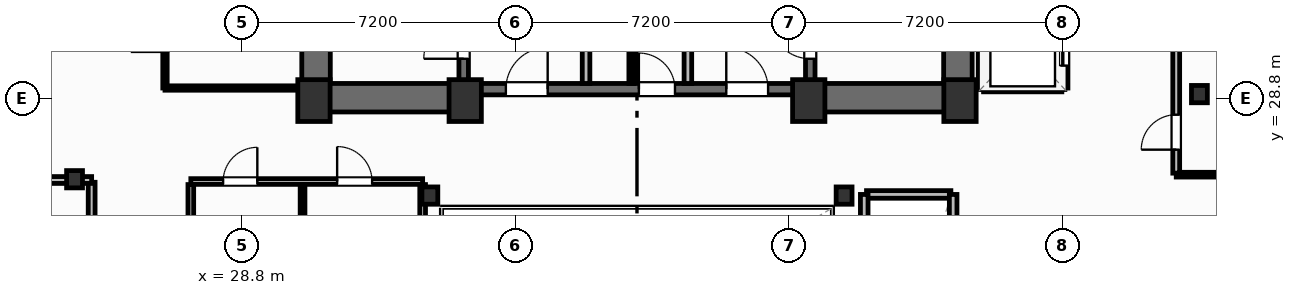
"""IFC4 building model, lengths in metres.
Left out: names, types, materials, properties, quantities, classifications, styles, units other than length and angle.
Written with IfcOpenShell. Run it as: python <this file> out.ifc"""

import sys

from ifc_helpers import new_model, si_unit, direction, frame, frame_2d, origin, origin_2d, place, context, subcontext, project, spatial, rectangle, i_section, extrude, element, fill, save


model = new_model("IFC4")
c1 = context("Model", 3, precision=1e-05, world=origin(), true_north=direction((0.0, 1.0)))
c2 = subcontext(c1, "Body", "Model", "MODEL_VIEW")
j1 = project(units=[si_unit("LENGTHUNIT", "METRE"), si_unit("PLANEANGLEUNIT", "RADIAN")], contexts=[c1])
p1 = place(None, origin())
s1 = spatial("IfcSite", under=j1, at=p1, CompositionType="ELEMENT")
p2 = place(p1, origin())
s2 = spatial("IfcBuilding", under=s1, at=p2, CompositionType="ELEMENT")
p3 = place(p2, frame((0.0, 0.0, 143.9)))
s3 = spatial("IfcBuildingStorey", under=s2, at=p3, CompositionType="ELEMENT", Elevation=143.9)
for number, where, z_axis, x_axis in (
    (1, (30.7, 28.75, 0.0), (0.0, 0.0, 1.0), (1.0, 0.0, 0.0)),
    (2, (34.68, 28.75, 0.0), (0.0, 0.0, 1.0), (1.0, 0.0, 0.0)),
    (3, (43.72, 28.75, 0.0), (0.0, 0.0, 1.0), (1.0, 0.0, 0.0)),
    (4, (47.7, 28.75, 0.0), (0.0, 0.0, 1.0), (1.0, 0.0, 0.0)),
):
    element("IfcColumn", number, at=place(p3, frame(where, z_axis=z_axis, x_axis=x_axis)), inside=s3, PredefinedType="COLUMN", context=c2, shape_type="SweptSolid", body=[
        extrude(rectangle(XDim=0.85, YDim=1.1, at=origin_2d()), origin(), (0.0, 0.0, 1.0), 3.7),
    ])
for number, where, z_axis, x_axis in (
    (5, (33.75, 26.25, 0.0), (0.0, 0.0, 1.0), (1.0, 0.0, 0.0)),
    (6, (44.65, 26.25, 0.0), (0.0, 0.0, 1.0), (1.0, 0.0, 0.0)),
    (7, (24.4, 26.68, 0.0), (0.0, 0.0, 1.0), (1.0, 0.0, 0.0)),
    (8, (54.0, 28.92, 0.0), (0.0, 0.0, 1.0), (1.0, 0.0, 0.0)),
):
    element("IfcColumn", number, at=place(p3, frame(where, z_axis=z_axis, x_axis=x_axis)), inside=s3, PredefinedType="COLUMN", context=c2, shape_type="SweptSolid", body=[
        extrude(i_section(OverallWidth=0.418, OverallDepth=0.455, WebThickness=0.042, FlangeThickness=0.068, FilletRadius=0.025, at=origin_2d()), origin(), (0.0, 0.0, 1.0), 3.7),
    ])
for number, where, z_axis, x_axis in (
    (9, (30.755, 29.2, 0.0), (0.0, 0.0, 1.0), (0.0, 1.0, 0.0)),
    (10, (47.645, 29.2, 0.0), (0.0, 0.0, 1.0), (0.0, 1.0, 0.0)),
):
    element("IfcWall", number, at=place(p3, frame(where, z_axis=z_axis, x_axis=x_axis)), inside=s3, PredefinedType="SHEAR", context=c2, shape_type="SweptSolid", body=[
        extrude(rectangle(XDim=9.22, YDim=0.75, at=frame_2d((4.61, 0.0))), origin(), (0.0, 0.0, 1.0), 3.45),
    ])
p4 = place(p3, frame((30.38, 28.825, 0.0), z_axis=(0.0, 0.0, 1.0), x_axis=(1.0, 0.0, 0.0)))
e11 = element("IfcWall", 11, at=p4, inside=s3, PredefinedType="SHEAR", context=c2, shape_type="SweptSolid", body=[
    extrude(rectangle(XDim=4.42, YDim=0.75, at=frame_2d((2.21, 0.0))), origin(), (0.0, 0.0, 1.0), 3.45),
])
p5 = place(p3, frame((43.6, 28.825, 0.0), z_axis=(0.0, 0.0, 1.0), x_axis=(1.0, 0.0, 0.0)))
e12 = element("IfcWall", 12, at=p5, inside=s3, PredefinedType="SHEAR", context=c2, shape_type="SweptSolid", body=[
    extrude(rectangle(XDim=4.42, YDim=0.75, at=frame_2d((2.21, 0.0))), origin(), (0.0, 0.0, 1.0), 3.45),
])
p6 = place(p3, frame((34.8, 29.05, 0.0), z_axis=(0.0, 0.0, 1.0), x_axis=(1.0, 0.0, 0.0)))
e13 = element("IfcWall", 13, at=p6, inside=s3, PredefinedType="SHEAR", context=c2, shape_type="SweptSolid", body=[
    extrude(rectangle(XDim=8.8, YDim=0.3, at=frame_2d((4.4, 0.0))), origin(), (0.0, 0.0, 1.0), 3.45),
])
p7 = place(p6, frame((0.95, 0.0, 0.0)))
e14 = element("IfcOpeningElement", 14, at=p7, cuts=e13, PredefinedType="OPENING", context=c2, shape_type="SweptSolid", body=[
    extrude(rectangle(XDim=1.1, YDim=2.15, at=frame_2d((0.55, 1.075))), frame((0.0, 0.16, 0.0), z_axis=(0.0, -1.0, 0.0), x_axis=(1.0, 0.0, 0.0)), (0.0, 0.0, 1.0), 0.32),
])
p8 = place(p6, frame((6.75, 0.0, 0.0)))
e15 = element("IfcOpeningElement", 15, at=p8, cuts=e13, PredefinedType="OPENING", context=c2, shape_type="SweptSolid", body=[
    extrude(rectangle(XDim=1.1, YDim=2.15, at=frame_2d((0.55, 1.075))), frame((0.0, 0.16, 0.0), z_axis=(0.0, -1.0, 0.0), x_axis=(1.0, 0.0, 0.0)), (0.0, 0.0, 1.0), 0.32),
])
p9 = place(p6, frame((4.45, 0.0, 0.0)))
e16 = element("IfcOpeningElement", 16, at=p9, cuts=e13, PredefinedType="OPENING", context=c2, shape_type="SweptSolid", body=[
    extrude(rectangle(XDim=0.95, YDim=2.15, at=frame_2d((0.475, 1.075))), frame((0.0, 0.16, 0.0), z_axis=(0.0, -1.0, 0.0), x_axis=(1.0, 0.0, 0.0)), (0.0, 0.0, 1.0), 0.32),
])
p10 = place(p3, frame((34.64, 29.2, 0.0), z_axis=(0.0, 0.0, 1.0), x_axis=(0.0, 1.0, 0.0)))
e17 = element("IfcWall", 17, at=p10, inside=s3, PredefinedType="SHEAR", context=c2, shape_type="SweptSolid", body=[
    extrude(rectangle(XDim=9.22, YDim=0.25, at=frame_2d((4.61, 0.0))), origin(), (0.0, 0.0, 1.0), 3.45),
])
p11 = place(p10, frame((0.65, 0.0, 0.0)))
e18 = element("IfcOpeningElement", 18, at=p11, cuts=e17, PredefinedType="OPENING", context=c2, shape_type="SweptSolid", body=[
    extrude(rectangle(XDim=1.05, YDim=2.15, at=frame_2d((0.525, 1.075))), frame((0.0, 0.135, 0.0), z_axis=(0.0, -1.0, 0.0), x_axis=(1.0, 0.0, 0.0)), (0.0, 0.0, 1.0), 0.27),
])
p12 = place(p3, frame((43.76, 29.2, 0.0), z_axis=(0.0, 0.0, 1.0), x_axis=(0.0, 1.0, 0.0)))
e19 = element("IfcWall", 19, at=p12, inside=s3, PredefinedType="SHEAR", context=c2, shape_type="SweptSolid", body=[
    extrude(rectangle(XDim=9.22, YDim=0.25, at=frame_2d((4.61, 0.0))), origin(), (0.0, 0.0, 1.0), 3.45),
])
p13 = place(p12, frame((0.65, 0.0, 0.0)))
e20 = element("IfcOpeningElement", 20, at=p13, cuts=e19, PredefinedType="OPENING", context=c2, shape_type="SweptSolid", body=[
    extrude(rectangle(XDim=1.05, YDim=2.15, at=frame_2d((0.525, 1.075))), frame((0.0, 0.135, 0.0), z_axis=(0.0, -1.0, 0.0), x_axis=(1.0, 0.0, 0.0)), (0.0, 0.0, 1.0), 0.27),
])
p14 = place(p3, frame((24.85, 23.03, 0.0), z_axis=(0.0, 0.0, 1.0), x_axis=(0.0, 1.0, 0.0)))
e21 = element("IfcWall", 21, at=p14, inside=s3, PredefinedType="PARTITIONING", context=c2, shape_type="SweptSolid", body=[
    extrude(rectangle(XDim=3.57, YDim=0.18, at=frame_2d((1.785, 0.0))), origin(), (0.0, 0.0, 1.0), 3.45),
])
p15 = place(p14, frame((1.5, 0.0, 0.0)))
e22 = element("IfcOpeningElement", 22, at=p15, cuts=e21, PredefinedType="OPENING", context=c2, shape_type="SweptSolid", body=[
    extrude(rectangle(XDim=0.92, YDim=2.05, at=frame_2d((0.46, 1.025))), frame((0.0, 0.1, 0.0), z_axis=(0.0, -1.0, 0.0), x_axis=(1.0, 0.0, 0.0)), (0.0, 0.0, 1.0), 0.2),
])
p16 = place(p3, frame((2.073, 26.66, 0.0), z_axis=(0.0, 0.0, 1.0), x_axis=(1.0, 0.0, 0.0)))
e23 = element("IfcWall", 23, at=p16, inside=s3, PredefinedType="PARTITIONING", context=c2, shape_type="SweptSolid", body=[
    extrude(rectangle(XDim=22.777, YDim=0.18, at=frame_2d((11.388, 0.0))), origin(), (0.0, 0.0, 1.0), 2.662),
])
p17 = place(p3, frame((53.39, 26.8, 0.0), z_axis=(0.0, 0.0, 1.0), x_axis=(1.0, 0.0, 0.0)))
e24 = element("IfcWall", 24, at=p17, inside=s3, PredefinedType="PARTITIONING", context=c2, shape_type="SweptSolid", body=[
    extrude(rectangle(XDim=23.283, YDim=0.125, at=frame_2d((11.642, 0.0))), origin(), (0.0, 0.0, 1.0), 3.45),
])
p18 = place(p3, frame((53.39, 26.84, 0.0), z_axis=(0.0, 0.0, 1.0), x_axis=(0.0, 1.0, 0.0)))
e25 = element("IfcWall", 25, at=p18, inside=s3, PredefinedType="PARTITIONING", context=c2, shape_type="SweptSolid", body=[
    extrude(rectangle(XDim=12.46, YDim=0.18, at=frame_2d((6.23, 0.0))), origin(), (0.0, 0.0, 1.0), 3.45),
])
p19 = place(p18, frame((0.618, 0.0, 0.0)))
e26 = element("IfcOpeningElement", 26, at=p19, cuts=e25, PredefinedType="OPENING", context=c2, shape_type="SweptSolid", body=[
    extrude(rectangle(XDim=0.92, YDim=2.05, at=frame_2d((0.46, 1.025))), frame((0.0, 0.1, 0.0), z_axis=(0.0, -1.0, 0.0), x_axis=(1.0, 0.0, 0.0)), (0.0, 0.0, 1.0), 0.2),
])
for number, where, z_axis, x_axis in (
    (27, (37.86, 29.2, 0.0), (0.0, 0.0, 1.0), (0.0, 1.0, 0.0)),
    (28, (40.54, 29.2, 0.0), (0.0, 0.0, 1.0), (0.0, 1.0, 0.0)),
):
    element("IfcWall", number, at=place(p3, frame(where, z_axis=z_axis, x_axis=x_axis)), inside=s3, PredefinedType="PARTITIONING", context=c2, shape_type="SweptSolid", body=[
        extrude(rectangle(XDim=5.18, YDim=0.2, at=frame_2d((2.59, 0.0))), origin(), (0.0, 0.0, 1.0), 3.45),
    ])
p20 = place(p3, frame((39.05, 29.2, 0.0), z_axis=(0.0, 0.0, 1.0), x_axis=(0.0, 1.0, 0.0)))
e29 = element("IfcWall", 29, at=p20, inside=s3, PredefinedType="PARTITIONING", context=c2, shape_type="SweptSolid", body=[
    extrude(rectangle(XDim=5.22, YDim=0.125, at=frame_2d((2.61, 0.0))), origin(), (0.0, 0.0, 1.0), 3.45),
])
p21 = place(p20, frame((2.05, 0.0, 0.0)))
e30 = element("IfcOpeningElement", 30, at=p21, cuts=e29, PredefinedType="OPENING", context=c2, shape_type="SweptSolid", body=[
    extrude(rectangle(XDim=0.85, YDim=2.05, at=frame_2d((0.425, 1.025))), frame((0.0, 0.073, 0.0), z_axis=(0.0, -1.0, 0.0), x_axis=(1.0, 0.0, 0.0)), (0.0, 0.0, 1.0), 0.145),
])
p22 = place(p3, frame((27.46, 26.62, 0.0), z_axis=(0.0, 0.0, 1.0), x_axis=(1.0, 0.0, 0.0)))
e31 = element("IfcWall", 31, at=p22, inside=s3, PredefinedType="PARTITIONING", context=c2, shape_type="SweptSolid", body=[
    extrude(rectangle(XDim=6.1, YDim=0.15, at=frame_2d((3.05, 0.0))), origin(), (0.0, 0.0, 1.0), 2.662),
])
p23 = place(p22, frame((0.85, 0.0, 0.0)))
e32 = element("IfcOpeningElement", 32, at=p23, cuts=e31, PredefinedType="OPENING", context=c2, shape_type="SweptSolid", body=[
    extrude(rectangle(XDim=0.9, YDim=2.05, at=frame_2d((0.45, 1.025))), frame((0.0, 0.085, 0.0), z_axis=(0.0, -1.0, 0.0), x_axis=(1.0, 0.0, 0.0)), (0.0, 0.0, 1.0), 0.17),
])
p24 = place(p22, frame((3.85, 0.0, 0.0)))
e33 = element("IfcOpeningElement", 33, at=p24, cuts=e31, PredefinedType="OPENING", context=c2, shape_type="SweptSolid", body=[
    extrude(rectangle(XDim=0.92, YDim=2.05, at=frame_2d((0.46, 1.025))), frame((0.0, 0.085, 0.0), z_axis=(0.0, -1.0, 0.0), x_axis=(1.0, 0.0, 0.0)), (0.0, 0.0, 1.0), 0.17),
])
p25 = place(p3, frame((30.4, 23.0, 0.0), z_axis=(0.0, 0.0, 1.0), x_axis=(0.0, 1.0, 0.0)))
e34 = element("IfcWall", 34, at=p25, inside=s3, PredefinedType="PARTITIONING", context=c2, shape_type="SweptSolid", body=[
    extrude(rectangle(XDim=3.54, YDim=0.125, at=frame_2d((1.77, 0.0))), origin(), (0.0, 0.0, 1.0), 3.45),
])
p26 = place(p3, frame((27.46, 19.38, 0.0), z_axis=(0.0, 0.0, 1.0), x_axis=(0.0, 1.0, 0.0)))
e35 = element("IfcWall", 35, at=p26, inside=s3, PredefinedType="PARTITIONING", context=c2, shape_type="SweptSolid", body=[
    extrude(rectangle(XDim=7.16, YDim=0.15, at=frame_2d((3.58, 0.0))), origin(), (0.0, 0.0, 1.0), 3.45),
])
p27 = place(p26, frame((1.1, 0.0, 0.0)))
e36 = element("IfcOpeningElement", 36, at=p27, cuts=e35, PredefinedType="OPENING", context=c2, shape_type="SweptSolid", body=[
    extrude(rectangle(XDim=0.95, YDim=2.05, at=frame_2d((0.475, 1.025))), frame((0.0, 0.085, 0.0), z_axis=(0.0, -1.0, 0.0), x_axis=(1.0, 0.0, 0.0)), (0.0, 0.0, 1.0), 0.17),
])
p28 = place(p3, frame((33.56, 19.38, 0.0), z_axis=(0.0, 0.0, 1.0), x_axis=(0.0, 1.0, 0.0)))
e37 = element("IfcWall", 37, at=p28, inside=s3, PredefinedType="PARTITIONING", context=c2, shape_type="SweptSolid", body=[
    extrude(rectangle(XDim=7.16, YDim=0.15, at=frame_2d((3.58, 0.0))), origin(), (0.0, 0.0, 1.0), 2.824),
])
p29 = place(p3, frame((26.78, 29.08, 0.0), z_axis=(0.0, 0.0, 1.0), x_axis=(1.0, 0.0, 0.0)))
e38 = element("IfcWall", 38, at=p29, inside=s3, PredefinedType="PARTITIONING", context=c2, shape_type="SweptSolid", body=[
    extrude(rectangle(XDim=3.6, YDim=0.115, at=frame_2d((1.8, 0.0))), origin(), (0.0, 0.0, 1.0), 3.45),
])
p30 = place(p3, frame((26.78, 29.08, 0.0), z_axis=(0.0, 0.0, 1.0), x_axis=(0.0, 1.0, 0.0)))
e39 = element("IfcWall", 39, at=p30, inside=s3, PredefinedType="PARTITIONING", context=c2, shape_type="SweptSolid", body=[
    extrude(rectangle(XDim=3.11, YDim=0.115, at=frame_2d((1.555, 0.0))), origin(), (0.0, 0.0, 1.0), 3.45),
])
p31 = place(p30, frame((0.95, 0.0, 0.0)))
e40 = element("IfcOpeningElement", 40, at=p31, cuts=e39, PredefinedType="OPENING", context=c2, shape_type="SweptSolid", body=[
    extrude(rectangle(XDim=0.9, YDim=2.05, at=frame_2d((0.45, 1.025))), frame((0.0, 0.067, 0.0), z_axis=(0.0, -1.0, 0.0), x_axis=(1.0, 0.0, 0.0)), (0.0, 0.0, 1.0), 0.135),
])
p32 = place(p3, frame((48.32, 29.08, 0.0), z_axis=(0.0, 0.0, 1.0), x_axis=(1.0, 0.0, 0.0)))
e41 = element("IfcWall", 41, at=p32, inside=s3, PredefinedType="PARTITIONING", context=c2, shape_type="SweptSolid", body=[
    extrude(rectangle(XDim=2.06, YDim=0.2, at=frame_2d((1.03, 0.0))), origin(), (0.0, 0.0, 1.0), 2.662),
])
p33 = place(p3, frame((48.28, 29.08, 0.0), z_axis=(0.0, 0.0, 1.0), x_axis=(0.0, 1.0, 0.0)))
e42 = element("IfcWall", 42, at=p33, inside=s3, PredefinedType="PARTITIONING", context=c2, shape_type="SweptSolid", body=[
    extrude(rectangle(XDim=6.89, YDim=0.2, at=frame_2d((3.445, 0.0))), origin(), (0.0, 0.0, 1.0), 3.45),
])
p34 = place(p3, frame((50.44, 29.08, 0.0), z_axis=(0.0, 0.0, 1.0), x_axis=(0.0, 1.0, 0.0)))
e43 = element("IfcWall", 43, at=p34, inside=s3, PredefinedType="PARTITIONING", context=c2, shape_type="SweptSolid", body=[
    extrude(rectangle(XDim=6.89, YDim=0.2, at=frame_2d((3.445, 0.0))), origin(), (0.0, 0.0, 1.0), 3.45),
])
p35 = place(p34, frame((0.59, 0.0, 0.0)))
e44 = element("IfcOpeningElement", 44, at=p35, cuts=e43, PredefinedType="OPENING", context=c2, shape_type="SweptSolid", body=[
    extrude(rectangle(XDim=1.1, YDim=2.15, at=frame_2d((0.55, 1.075))), frame((0.0, 0.11, 0.0), z_axis=(0.0, -1.0, 0.0), x_axis=(1.0, 0.0, 0.0)), (0.0, 0.0, 1.0), 0.22),
])
p36 = place(p34, frame((2.89, 0.0, 0.0)))
e45 = element("IfcOpeningElement", 45, at=p36, cuts=e43, PredefinedType="OPENING", context=c2, shape_type="SweptSolid", body=[
    extrude(rectangle(XDim=1.1, YDim=2.15, at=frame_2d((0.55, 1.075))), frame((0.0, 0.11, 0.0), z_axis=(0.0, -1.0, 0.0), x_axis=(1.0, 0.0, 0.0)), (0.0, 0.0, 1.0), 0.22),
])
p37 = place(p34, frame((5.19, 0.0, 0.0)))
e46 = element("IfcOpeningElement", 46, at=p37, cuts=e43, PredefinedType="OPENING", context=c2, shape_type="SweptSolid", body=[
    extrude(rectangle(XDim=1.1, YDim=2.15, at=frame_2d((0.55, 1.075))), frame((0.0, 0.11, 0.0), z_axis=(0.0, -1.0, 0.0), x_axis=(1.0, 0.0, 0.0)), (0.0, 0.0, 1.0), 0.22),
])
p38 = place(p3, frame((45.24, 26.28, 0.0), z_axis=(0.0, 0.0, 1.0), x_axis=(1.0, 0.0, 0.0)))
e47 = element("IfcWall", 47, at=p38, inside=s3, PredefinedType="PARTITIONING", context=c2, shape_type="SweptSolid", body=[
    extrude(rectangle(XDim=2.22, YDim=0.2, at=frame_2d((1.11, 0.0))), origin(), (0.0, 0.0, 1.0), 3.45),
])
for number, where, z_axis, x_axis in (
    (48, (45.18, 19.38, 0.0), (0.0, 0.0, 1.0), (0.0, 1.0, 0.0)),
    (49, (47.52, 19.38, 0.0), (0.0, 0.0, 1.0), (0.0, 1.0, 0.0)),
):
    element("IfcWall", number, at=place(p3, frame(where, z_axis=z_axis, x_axis=x_axis)), inside=s3, PredefinedType="PARTITIONING", context=c2, shape_type="SweptSolid", body=[
        extrude(rectangle(XDim=6.9, YDim=0.2, at=frame_2d((3.45, 0.0))), origin(), (0.0, 0.0, 1.0), 3.45),
    ])
p39 = place(p19, origin())
e50 = element("IfcDoor", 50, at=p39, inside=s3, OperationType="SINGLE_SWING_LEFT", PredefinedType="DOOR", context=c2, shape_type="SweptSolid", body=[
    extrude(rectangle(XDim=0.92, YDim=2.05, at=frame_2d((0.46, 1.025))), frame((0.0, 0.025, 0.0), z_axis=(0.0, -1.0, 0.0), x_axis=(1.0, 0.0, 0.0)), (0.0, 0.0, 1.0), 0.05),
])
fill(e26, e50)
p40 = place(p11, origin())
e51 = element("IfcDoor", 51, at=p40, inside=s3, OperationType="SINGLE_SWING_LEFT", PredefinedType="DOOR", context=c2, shape_type="SweptSolid", body=[
    extrude(rectangle(XDim=1.05, YDim=2.15, at=frame_2d((0.525, 1.075))), frame((0.0, 0.025, 0.0), z_axis=(0.0, -1.0, 0.0), x_axis=(1.0, 0.0, 0.0)), (0.0, 0.0, 1.0), 0.05),
])
fill(e18, e51)
p41 = place(p13, origin())
e52 = element("IfcDoor", 52, at=p41, inside=s3, OperationType="SINGLE_SWING_RIGHT", PredefinedType="DOOR", context=c2, shape_type="SweptSolid", body=[
    extrude(rectangle(XDim=1.05, YDim=2.15, at=frame_2d((0.525, 1.075))), frame((0.0, 0.025, 0.0), z_axis=(0.0, -1.0, 0.0), x_axis=(1.0, 0.0, 0.0)), (0.0, 0.0, 1.0), 0.05),
])
fill(e20, e52)
p42 = place(p7, origin())
e53 = element("IfcDoor", 53, at=p42, inside=s3, OperationType="SINGLE_SWING_RIGHT", PredefinedType="DOOR", context=c2, shape_type="SweptSolid", body=[
    extrude(rectangle(XDim=1.1, YDim=2.15, at=frame_2d((0.55, 1.075))), frame((0.0, 0.025, 0.0), z_axis=(0.0, -1.0, 0.0), x_axis=(1.0, 0.0, 0.0)), (0.0, 0.0, 1.0), 0.05),
])
fill(e14, e53)
p43 = place(p8, origin())
e54 = element("IfcDoor", 54, at=p43, inside=s3, OperationType="SINGLE_SWING_LEFT", PredefinedType="DOOR", context=c2, shape_type="SweptSolid", body=[
    extrude(rectangle(XDim=1.1, YDim=2.15, at=frame_2d((0.55, 1.075))), frame((0.0, 0.025, 0.0), z_axis=(0.0, -1.0, 0.0), x_axis=(1.0, 0.0, 0.0)), (0.0, 0.0, 1.0), 0.05),
])
fill(e15, e54)
p44 = place(p9, origin())
e55 = element("IfcDoor", 55, at=p44, inside=s3, OperationType="SINGLE_SWING_LEFT", PredefinedType="DOOR", context=c2, shape_type="SweptSolid", body=[
    extrude(rectangle(XDim=0.95, YDim=2.15, at=frame_2d((0.475, 1.075))), frame((0.0, 0.025, 0.0), z_axis=(0.0, -1.0, 0.0), x_axis=(1.0, 0.0, 0.0)), (0.0, 0.0, 1.0), 0.05),
])
fill(e16, e55)
p45 = place(p23, origin())
e56 = element("IfcDoor", 56, at=p45, inside=s3, OperationType="SINGLE_SWING_RIGHT", PredefinedType="DOOR", context=c2, shape_type="SweptSolid", body=[
    extrude(rectangle(XDim=0.9, YDim=2.05, at=frame_2d((0.45, 1.025))), frame((0.0, 0.025, 0.0), z_axis=(0.0, -1.0, 0.0), x_axis=(1.0, 0.0, 0.0)), (0.0, 0.0, 1.0), 0.05),
])
fill(e32, e56)
p46 = place(p24, origin())
e57 = element("IfcDoor", 57, at=p46, inside=s3, OperationType="SINGLE_SWING_LEFT", PredefinedType="DOOR", context=c2, shape_type="SweptSolid", body=[
    extrude(rectangle(XDim=0.92, YDim=2.05, at=frame_2d((0.46, 1.025))), frame((0.0, 0.025, 0.0), z_axis=(0.0, -1.0, 0.0), x_axis=(1.0, 0.0, 0.0)), (0.0, 0.0, 1.0), 0.05),
])
fill(e33, e57)
p47 = place(p35, origin())
e58 = element("IfcDoor", 58, at=p47, inside=s3, OperationType="SLIDING_TO_LEFT", PredefinedType="DOOR", context=c2, shape_type="SweptSolid", body=[
    extrude(rectangle(XDim=1.1, YDim=2.15, at=frame_2d((0.55, 1.075))), frame((0.0, 0.025, 0.0), z_axis=(0.0, -1.0, 0.0), x_axis=(1.0, 0.0, 0.0)), (0.0, 0.0, 1.0), 0.05),
])
fill(e44, e58)
save(model, sys.argv[1])
